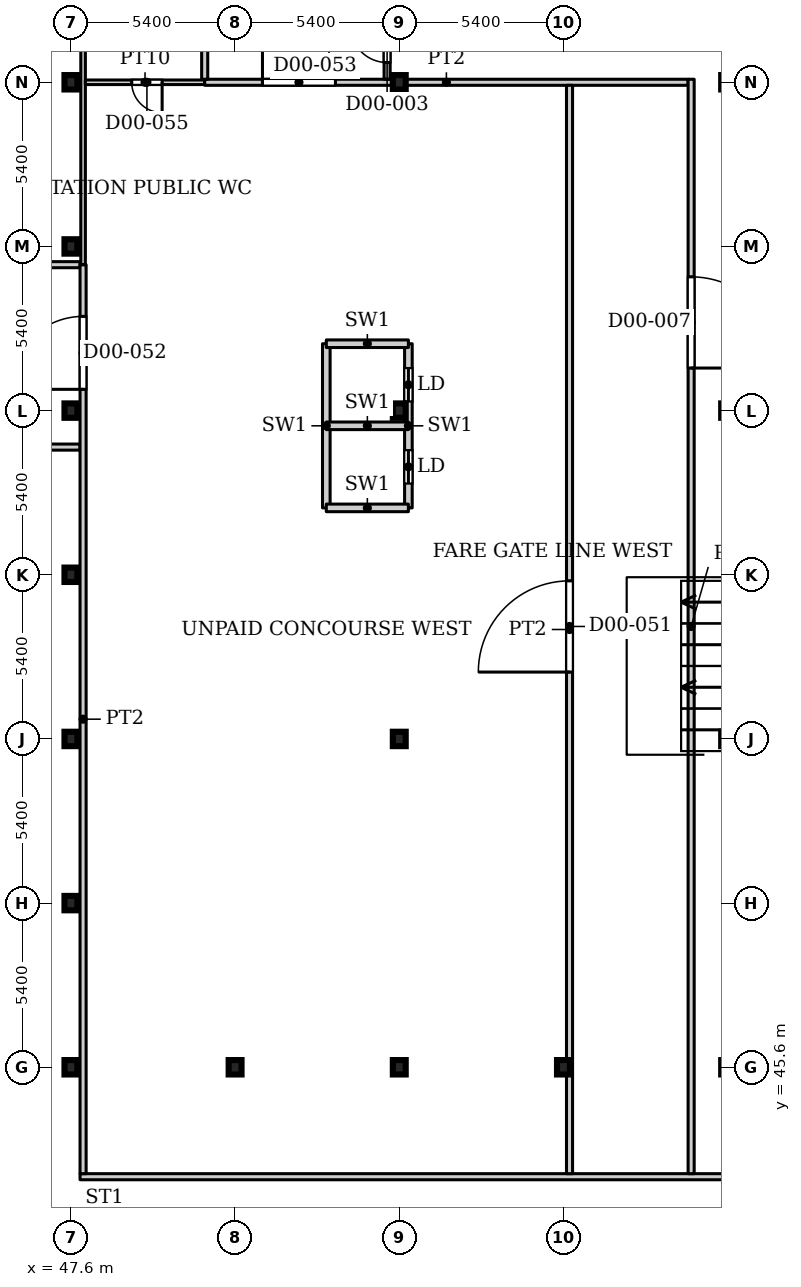
"""IFC4 building model, lengths in metres.
Left out: names, types, materials, properties, quantities, classifications, styles, units other than length and angle.
Written with IfcOpenShell. Run it as: python <this file> out.ifc"""

import sys

from ifc_helpers import new_model, si_unit, direction, frame, frame_2d, origin, origin_2d, place, context, subcontext, project, spatial, rectangle, i_section, extrude, source, transform, mapped, element, fill, save


model = new_model("IFC4")
c1 = context("Model", 3, precision=1e-05, world=origin(), true_north=direction((0.0, 1.0)))
c2 = subcontext(c1, "Body", "Model", "MODEL_VIEW")
j1 = project(units=[si_unit("LENGTHUNIT", "METRE"), si_unit("PLANEANGLEUNIT", "RADIAN")], contexts=[c1])
p1 = place(None, origin())
s1 = spatial("IfcSite", under=j1, at=p1, CompositionType="ELEMENT")
p2 = place(p1, origin())
s2 = spatial("IfcBuilding", under=s1, at=p2, CompositionType="ELEMENT")
p3 = place(p2, origin())
s3 = spatial("IfcBuildingStorey", under=s2, at=p3, CompositionType="ELEMENT", Elevation=0.0)
for number, where, z_axis, x_axis in (
    (1, (47.6, 45.6, 0.0), (0.0, 0.0, 1.0), (1.0, 0.0, 0.0)),
    (2, (58.4, 45.6, 0.0), (0.0, 0.0, 1.0), (1.0, 0.0, 0.0)),
    (3, (69.2, 45.6, 0.0), (0.0, 0.0, 1.0), (1.0, 0.0, 0.0)),
    (4, (47.6, 56.4, 0.0), (0.0, 0.0, 1.0), (1.0, 0.0, 0.0)),
    (5, (58.4, 56.4, 0.0), (0.0, 0.0, 1.0), (1.0, 0.0, 0.0)),
    (6, (69.2, 56.4, 0.0), (0.0, 0.0, 1.0), (1.0, 0.0, 0.0)),
    (7, (47.6, 67.2, 0.0), (0.0, 0.0, 1.0), (1.0, 0.0, 0.0)),
    (8, (58.4, 67.2, 0.0), (0.0, 0.0, 1.0), (1.0, 0.0, 0.0)),
    (9, (69.2, 67.2, 0.0), (0.0, 0.0, 1.0), (1.0, 0.0, 0.0)),
    (10, (47.6, 78.0, 0.0), (0.0, 0.0, 1.0), (1.0, 0.0, 0.0)),
    (11, (58.4, 78.0, 0.0), (0.0, 0.0, 1.0), (1.0, 0.0, 0.0)),
    (12, (69.2, 78.0, 0.0), (0.0, 0.0, 1.0), (1.0, 0.0, 0.0)),
    (13, (53.0, 45.6, 0.0), (0.0, 0.0, 1.0), (1.0, 0.0, 0.0)),
    (14, (63.8, 45.6, 0.0), (0.0, 0.0, 1.0), (1.0, 0.0, 0.0)),
    (15, (47.6, 51.0, 0.0), (0.0, 0.0, 1.0), (1.0, 0.0, 0.0)),
    (16, (47.6, 61.8, 0.0), (0.0, 0.0, 1.0), (1.0, 0.0, 0.0)),
    (17, (47.6, 72.6, 0.0), (0.0, 0.0, 1.0), (1.0, 0.0, 0.0)),
):
    element("IfcColumn", number, at=place(p3, frame(where, z_axis=z_axis, x_axis=x_axis)), inside=s3, PredefinedType="COLUMN", context=c2, shape_type="SweptSolid", body=[
        extrude(i_section(OverallWidth=0.424, OverallDepth=0.474, WebThickness=0.048, FlangeThickness=0.077, FilletRadius=0.014, at=origin_2d()), origin(), (0.0, 0.0, 1.0), 7.5),
    ])
p4 = place(p3, frame((56.0, 64.0, 0.0), z_axis=(0.0, 0.0, 1.0), x_axis=(0.0, 1.0, 0.0)))
e18 = element("IfcWall", 18, at=p4, inside=s3, PredefinedType="PARTITIONING", context=c2, shape_type="SweptSolid", body=[
    extrude(rectangle(XDim=5.4, YDim=0.25, at=frame_2d((2.7, 0.0))), origin(), (0.0, 0.0, 1.0), 7.5),
])
p5 = place(p3, frame((58.7, 64.0, 0.0), z_axis=(0.0, 0.0, 1.0), x_axis=(0.0, 1.0, 0.0)))
e19 = element("IfcWall", 19, at=p5, inside=s3, PredefinedType="PARTITIONING", context=c2, shape_type="SweptSolid", body=[
    extrude(rectangle(XDim=5.4, YDim=0.25, at=frame_2d((2.7, 0.0))), origin(), (0.0, 0.0, 1.0), 7.5),
])
p6 = place(p5, frame((0.8, 0.0, 0.0)))
e20 = element("IfcOpeningElement", 20, at=p6, cuts=e19, PredefinedType="OPENING", context=c2, shape_type="SweptSolid", body=[
    extrude(rectangle(XDim=1.1, YDim=2.2, at=frame_2d((0.55, 1.1))), frame((0.0, 0.135, 0.0), z_axis=(0.0, -1.0, 0.0), x_axis=(1.0, 0.0, 0.0)), (0.0, 0.0, 1.0), 0.27),
])
p7 = place(p5, frame((3.5, 0.0, 0.0)))
e21 = element("IfcOpeningElement", 21, at=p7, cuts=e19, PredefinedType="OPENING", context=c2, shape_type="SweptSolid", body=[
    extrude(rectangle(XDim=1.1, YDim=2.2, at=frame_2d((0.55, 1.1))), frame((0.0, 0.135, 0.0), z_axis=(0.0, -1.0, 0.0), x_axis=(1.0, 0.0, 0.0)), (0.0, 0.0, 1.0), 0.27),
])
for number, where, z_axis, x_axis in (
    (22, (56.0, 64.0, 0.0), (0.0, 0.0, 1.0), (1.0, 0.0, 0.0)),
    (23, (56.0, 66.7, 0.0), (0.0, 0.0, 1.0), (1.0, 0.0, 0.0)),
    (24, (56.0, 69.4, 0.0), (0.0, 0.0, 1.0), (1.0, 0.0, 0.0)),
):
    element("IfcWall", number, at=place(p3, frame(where, z_axis=z_axis, x_axis=x_axis)), inside=s3, PredefinedType="PARTITIONING", context=c2, shape_type="SweptSolid", body=[
        extrude(rectangle(XDim=2.7, YDim=0.25, at=frame_2d((1.35, 0.0))), origin(), (0.0, 0.0, 1.0), 7.5),
    ])
p8 = place(p3, frame((12.0, 66.0, 0.0), z_axis=(0.0, 0.0, 1.0), x_axis=(1.0, 0.0, 0.0)))
e25 = element("IfcWall", 25, at=p8, inside=s3, PredefinedType="PARTITIONING", context=c2, shape_type="SweptSolid", body=[
    extrude(rectangle(XDim=35.9, YDim=0.2, at=frame_2d((17.95, 0.0))), origin(), (0.0, 0.0, 1.0), 7.08),
])
p9 = place(p3, frame((12.0, 72.0, 0.0), z_axis=(0.0, 0.0, 1.0), x_axis=(1.0, 0.0, 0.0)))
e26 = element("IfcWall", 26, at=p9, inside=s3, PredefinedType="PARTITIONING", context=c2, shape_type="SweptSolid", body=[
    extrude(rectangle(XDim=35.9, YDim=0.2, at=frame_2d((17.95, 0.0))), origin(), (0.0, 0.0, 1.0), 7.08),
])
p10 = place(p9, frame((6.75, 0.0, 0.0)))
e27 = element("IfcOpeningElement", 27, at=p10, cuts=e26, PredefinedType="OPENING", context=c2, shape_type="SweptSolid", body=[
    extrude(rectangle(XDim=1.0, YDim=2.1, at=frame_2d((0.5, 1.05))), frame((0.0, 0.11, 0.0), z_axis=(0.0, -1.0, 0.0), x_axis=(1.0, 0.0, 0.0)), (0.0, 0.0, 1.0), 0.22),
])
p11 = place(p3, frame((47.9, 42.0, 0.0), z_axis=(0.0, 0.0, 1.0), x_axis=(1.0, 0.0, 0.0)))
e28 = element("IfcWall", 28, at=p11, inside=s3, PredefinedType="PARTITIONING", context=c2, shape_type="SweptSolid", body=[
    extrude(rectangle(XDim=64.1, YDim=0.2, at=frame_2d((32.05, 0.0))), origin(), (0.0, 0.0, 1.0), 7.08),
])
p12 = place(p11, frame((47.5, 0.0, 0.0)))
e29 = element("IfcOpeningElement", 29, at=p12, cuts=e28, PredefinedType="OPENING", context=c2, shape_type="SweptSolid", body=[
    extrude(rectangle(XDim=1.0, YDim=2.1, at=frame_2d((0.5, 1.05))), frame((0.0, 0.11, 0.0), z_axis=(0.0, -1.0, 0.0), x_axis=(1.0, 0.0, 0.0)), (0.0, 0.0, 1.0), 0.22),
])
p13 = place(p11, frame((55.5, 0.0, 0.0)))
e30 = element("IfcOpeningElement", 30, at=p13, cuts=e28, PredefinedType="OPENING", context=c2, shape_type="SweptSolid", body=[
    extrude(rectangle(XDim=1.0, YDim=2.1, at=frame_2d((0.5, 1.05))), frame((0.0, 0.11, 0.0), z_axis=(0.0, -1.0, 0.0), x_axis=(1.0, 0.0, 0.0)), (0.0, 0.0, 1.0), 0.22),
])
p14 = place(p3, frame((48.0, 42.1, 0.0), z_axis=(0.0, 0.0, 1.0), x_axis=(0.0, 1.0, 0.0)))
e31 = element("IfcWall", 31, at=p14, inside=s3, PredefinedType="PARTITIONING", context=c2, shape_type="SweptSolid", body=[
    extrude(rectangle(XDim=29.9, YDim=0.2, at=frame_2d((14.95, 0.0))), origin(), (0.0, 0.0, 1.0), 7.08),
])
p15 = place(p14, frame((25.8, 0.0, 0.0)))
e32 = element("IfcOpeningElement", 32, at=p15, cuts=e31, PredefinedType="OPENING", context=c2, shape_type="SweptSolid", body=[
    extrude(rectangle(XDim=2.4, YDim=2.1, at=frame_2d((1.2, 1.05))), frame((0.0, 0.11, 0.0), z_axis=(0.0, -1.0, 0.0), x_axis=(1.0, 0.0, 0.0)), (0.0, 0.0, 1.0), 0.22),
])
p16 = place(p3, frame((48.0, 72.0, 0.0), z_axis=(0.0, 0.0, 1.0), x_axis=(0.0, 1.0, 0.0)))
e33 = element("IfcWall", 33, at=p16, inside=s3, PredefinedType="PARTITIONING", context=c2, shape_type="SweptSolid", body=[
    extrude(rectangle(XDim=18.075, YDim=0.15, at=frame_2d((9.038, 0.0))), origin(), (0.0, 0.0, 1.0), 7.08),
])
p17 = place(p3, frame((48.075, 78.0, 0.0), z_axis=(0.0, 0.0, 1.0), x_axis=(1.0, 0.0, 0.0)))
e34 = element("IfcWall", 34, at=p17, inside=s3, PredefinedType="PARTITIONING", context=c2, shape_type="SweptSolid", body=[
    extrude(rectangle(XDim=3.925, YDim=0.15, at=frame_2d((1.962, 0.0))), origin(), (0.0, 0.0, 1.0), 7.08),
])
p18 = place(p17, frame((1.525, 0.0, 0.0)))
e35 = element("IfcOpeningElement", 35, at=p18, cuts=e34, PredefinedType="OPENING", context=c2, shape_type="SweptSolid", body=[
    extrude(rectangle(XDim=1.0, YDim=2.1, at=frame_2d((0.5, 1.05))), frame((0.0, 0.085, 0.0), z_axis=(0.0, -1.0, 0.0), x_axis=(1.0, 0.0, 0.0)), (0.0, 0.0, 1.0), 0.17),
])
p19 = place(p3, frame((52.0, 78.0, 0.0), z_axis=(0.0, 0.0, 1.0), x_axis=(1.0, 0.0, 0.0)))
e36 = element("IfcWall", 36, at=p19, inside=s3, PredefinedType="PARTITIONING", context=c2, shape_type="SweptSolid", body=[
    extrude(rectangle(XDim=15.9, YDim=0.2, at=frame_2d((7.95, 0.0))), origin(), (0.0, 0.0, 1.0), 7.08),
])
p20 = place(p19, frame((1.9, 0.0, 0.0)))
e37 = element("IfcOpeningElement", 37, at=p20, cuts=e36, PredefinedType="OPENING", context=c2, shape_type="SweptSolid", body=[
    extrude(rectangle(XDim=2.4, YDim=2.1, at=frame_2d((1.2, 1.05))), frame((0.0, 0.11, 0.0), z_axis=(0.0, -1.0, 0.0), x_axis=(1.0, 0.0, 0.0)), (0.0, 0.0, 1.0), 0.22),
])
p21 = place(p3, frame((52.0, 78.1, 0.0), z_axis=(0.0, 0.0, 1.0), x_axis=(0.0, 1.0, 0.0)))
e38 = element("IfcWall", 38, at=p21, inside=s3, PredefinedType="PARTITIONING", context=c2, shape_type="SweptSolid", body=[
    extrude(rectangle(XDim=31.9, YDim=0.2, at=frame_2d((15.95, 0.0))), origin(), (0.0, 0.0, 1.0), 7.08),
])
p22 = place(p21, frame((14.15, 0.0, 0.0)))
e39 = element("IfcOpeningElement", 39, at=p22, cuts=e38, PredefinedType="OPENING", context=c2, shape_type="SweptSolid", body=[
    extrude(rectangle(XDim=2.0, YDim=2.1, at=frame_2d((1.0, 1.05))), frame((0.0, 0.11, 0.0), z_axis=(0.0, -1.0, 0.0), x_axis=(1.0, 0.0, 0.0)), (0.0, 0.0, 1.0), 0.22),
])
p23 = place(p21, frame((8.5, 0.0, 0.0)))
e40 = element("IfcOpeningElement", 40, at=p23, cuts=e38, PredefinedType="OPENING", context=c2, shape_type="SweptSolid", body=[
    extrude(rectangle(XDim=1.0, YDim=2.1, at=frame_2d((0.5, 1.05))), frame((0.0, 0.11, 0.0), z_axis=(0.0, -1.0, 0.0), x_axis=(1.0, 0.0, 0.0)), (0.0, 0.0, 1.0), 0.22),
])
p24 = place(p3, frame((58.0, 78.1, 0.0), z_axis=(0.0, 0.0, 1.0), x_axis=(0.0, 1.0, 0.0)))
e41 = element("IfcWall", 41, at=p24, inside=s3, PredefinedType="PARTITIONING", context=c2, shape_type="SweptSolid", body=[
    extrude(rectangle(XDim=31.9, YDim=0.2, at=frame_2d((15.95, 0.0))), origin(), (0.0, 0.0, 1.0), 7.08),
])
p25 = place(p24, frame((0.55, 0.0, 0.0)))
e42 = element("IfcOpeningElement", 42, at=p25, cuts=e41, PredefinedType="OPENING", context=c2, shape_type="SweptSolid", body=[
    extrude(rectangle(XDim=1.2, YDim=2.1, at=frame_2d((0.6, 1.05))), frame((0.0, 0.11, 0.0), z_axis=(0.0, -1.0, 0.0), x_axis=(1.0, 0.0, 0.0)), (0.0, 0.0, 1.0), 0.22),
])
p26 = place(p3, frame((64.0, 42.1, 0.0), z_axis=(0.0, 0.0, 1.0), x_axis=(0.0, 1.0, 0.0)))
e43 = element("IfcWall", 43, at=p26, inside=s3, PredefinedType="PARTITIONING", context=c2, shape_type="SweptSolid", body=[
    extrude(rectangle(XDim=35.8, YDim=0.2, at=frame_2d((17.9, 0.0))), origin(), (0.0, 0.0, 1.0), 7.08),
])
p27 = place(p26, frame((16.5, 0.0, 0.0)))
e44 = element("IfcOpeningElement", 44, at=p27, cuts=e43, PredefinedType="OPENING", context=c2, shape_type="SweptSolid", body=[
    extrude(rectangle(XDim=3.0, YDim=2.1, at=frame_2d((1.5, 1.05))), frame((0.0, 0.11, 0.0), z_axis=(0.0, -1.0, 0.0), x_axis=(1.0, 0.0, 0.0)), (0.0, 0.0, 1.0), 0.22),
])
p28 = place(p3, frame((68.0, 42.1, 0.0), z_axis=(0.0, 0.0, 1.0), x_axis=(0.0, 1.0, 0.0)))
e45 = element("IfcWall", 45, at=p28, inside=s3, PredefinedType="PARTITIONING", context=c2, shape_type="SweptSolid", body=[
    extrude(rectangle(XDim=36.0, YDim=0.2, at=frame_2d((18.0, 0.0))), origin(), (0.0, 0.0, 1.0), 7.08),
])
p29 = place(p28, frame((26.5, 0.0, 0.0)))
e46 = element("IfcOpeningElement", 46, at=p29, cuts=e45, PredefinedType="OPENING", context=c2, shape_type="SweptSolid", body=[
    extrude(rectangle(XDim=3.0, YDim=2.1, at=frame_2d((1.5, 1.05))), frame((0.0, 0.11, 0.0), z_axis=(0.0, -1.0, 0.0), x_axis=(1.0, 0.0, 0.0)), (0.0, 0.0, 1.0), 0.22),
])
m1 = source(origin(), c2, "Body", "SweptSolid", [
    extrude(rectangle(XDim=1.1, YDim=2.2, at=frame_2d((0.55, 1.1))), frame((0.0, 0.025, 0.0), z_axis=(0.0, -1.0, 0.0), x_axis=(1.0, 0.0, 0.0)), (0.0, 0.0, 1.0), 0.05),
])
p30 = place(p6, origin())
e47 = element("IfcDoor", 47, at=p30, inside=s3, OperationType="SLIDING_TO_LEFT", PredefinedType="DOOR", context=c2, shape_type="MappedRepresentation", body=[
    mapped(m1, transform((0.0, 0.0, 0.0), x_axis=(1.0, 0.0, 0.0), y_axis=(0.0, 1.0, 0.0), z_axis=(0.0, 0.0, 1.0), scale=1.0)),
])
fill(e20, e47)
p31 = place(p7, origin())
e48 = element("IfcDoor", 48, at=p31, inside=s3, OperationType="SLIDING_TO_LEFT", PredefinedType="DOOR", context=c2, shape_type="MappedRepresentation", body=[
    mapped(m1, transform((0.0, 0.0, 0.0), x_axis=(1.0, 0.0, 0.0), y_axis=(0.0, 1.0, 0.0), z_axis=(0.0, 0.0, 1.0), scale=1.0)),
])
fill(e21, e48)
m2 = source(origin(), c2, "Body", "SweptSolid", [
    extrude(rectangle(XDim=1.2, YDim=2.1, at=frame_2d((0.6, 1.05))), frame((0.0, 0.025, 0.0), z_axis=(0.0, -1.0, 0.0), x_axis=(1.0, 0.0, 0.0)), (0.0, 0.0, 1.0), 0.05),
])
p32 = place(p25, origin())
e49 = element("IfcDoor", 49, at=p32, inside=s3, OperationType="SINGLE_SWING_LEFT", PredefinedType="DOOR", context=c2, shape_type="MappedRepresentation", body=[
    mapped(m2, transform((0.0, 0.0, 0.0), x_axis=(1.0, 0.0, 0.0), y_axis=(0.0, 1.0, 0.0), z_axis=(0.0, 0.0, 1.0), scale=1.0)),
])
fill(e42, e49)
m3 = source(origin(), c2, "Body", "SweptSolid", [
    extrude(rectangle(XDim=3.0, YDim=2.1, at=frame_2d((1.5, 1.05))), frame((0.0, 0.025, 0.0), z_axis=(0.0, -1.0, 0.0), x_axis=(1.0, 0.0, 0.0)), (0.0, 0.0, 1.0), 0.05),
])
p33 = place(p29, origin())
e50 = element("IfcDoor", 50, at=p33, inside=s3, OperationType="DOUBLE_DOOR_SINGLE_SWING", PredefinedType="DOOR", context=c2, shape_type="MappedRepresentation", body=[
    mapped(m3, transform((0.0, 0.0, 0.0), x_axis=(1.0, 0.0, 0.0), y_axis=(0.0, 1.0, 0.0), z_axis=(0.0, 0.0, 1.0), scale=1.0)),
])
fill(e46, e50)
p34 = place(p27, origin())
e51 = element("IfcDoor", 51, at=p34, inside=s3, OperationType="DOUBLE_DOOR_SINGLE_SWING", PredefinedType="DOOR", context=c2, shape_type="MappedRepresentation", body=[
    mapped(m3, transform((0.0, 0.0, 0.0), x_axis=(1.0, 0.0, 0.0), y_axis=(0.0, 1.0, 0.0), z_axis=(0.0, 0.0, 1.0), scale=1.0)),
])
fill(e44, e51)
m4 = source(origin(), c2, "Body", "SweptSolid", [
    extrude(rectangle(XDim=2.4, YDim=2.1, at=frame_2d((1.2, 1.05))), frame((0.0, 0.025, 0.0), z_axis=(0.0, -1.0, 0.0), x_axis=(1.0, 0.0, 0.0)), (0.0, 0.0, 1.0), 0.05),
])
p35 = place(p15, origin())
e52 = element("IfcDoor", 52, at=p35, inside=s3, OperationType="DOUBLE_DOOR_SINGLE_SWING", PredefinedType="DOOR", context=c2, shape_type="MappedRepresentation", body=[
    mapped(m4, transform((0.0, 0.0, 0.0), x_axis=(1.0, 0.0, 0.0), y_axis=(0.0, 1.0, 0.0), z_axis=(0.0, 0.0, 1.0), scale=1.0)),
])
fill(e32, e52)
p36 = place(p20, origin())
e53 = element("IfcDoor", 53, at=p36, inside=s3, OperationType="DOUBLE_DOOR_SINGLE_SWING", PredefinedType="DOOR", context=c2, shape_type="MappedRepresentation", body=[
    mapped(m4, transform((0.0, 0.0, 0.0), x_axis=(1.0, 0.0, 0.0), y_axis=(0.0, 1.0, 0.0), z_axis=(0.0, 0.0, 1.0), scale=1.0)),
])
fill(e37, e53)
m5 = source(origin(), c2, "Body", "SweptSolid", [
    extrude(rectangle(XDim=1.0, YDim=2.1, at=frame_2d((0.5, 1.05))), frame((0.0, 0.025, 0.0), z_axis=(0.0, -1.0, 0.0), x_axis=(1.0, 0.0, 0.0)), (0.0, 0.0, 1.0), 0.05),
])
p37 = place(p18, origin())
e54 = element("IfcDoor", 54, at=p37, inside=s3, OperationType="SINGLE_SWING_RIGHT", PredefinedType="DOOR", context=c2, shape_type="MappedRepresentation", body=[
    mapped(m5, transform((0.0, 0.0, 0.0), x_axis=(1.0, 0.0, 0.0), y_axis=(0.0, 1.0, 0.0), z_axis=(0.0, 0.0, 1.0), scale=1.0)),
])
fill(e35, e54)
save(model, sys.argv[1])
